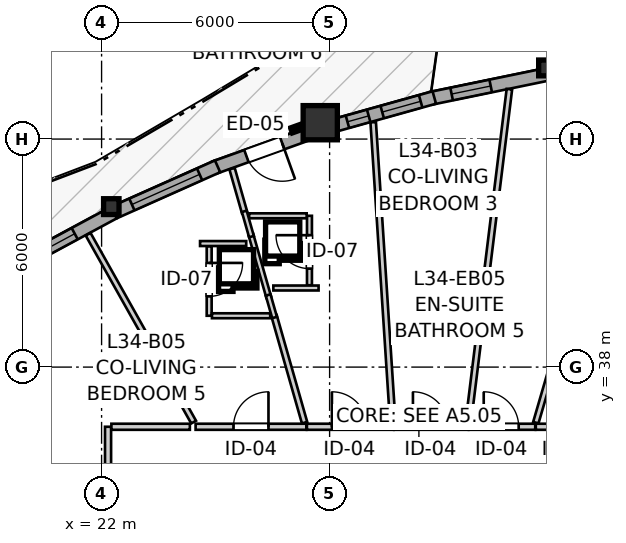
"""IFC4 building model, lengths in metres.
Left out: names, types, materials, properties, quantities, classifications, styles, units other than length and angle.
Written with IfcOpenShell. Run it as: python <this file> out.ifc"""

import sys

from ifc_helpers import new_model, si_unit, direction, frame, frame_2d, origin, origin_2d, place, context, subcontext, project, spatial, rectangle, i_section, extrude, source, transform, mapped, element, fill, save


model = new_model("IFC4")
c1 = context("Model", 3, precision=1e-05, world=origin(), true_north=direction((0.0, 1.0)))
c2 = subcontext(c1, "Body", "Model", "MODEL_VIEW")
j1 = project(units=[si_unit("LENGTHUNIT", "METRE"), si_unit("PLANEANGLEUNIT", "RADIAN")], contexts=[c1])
p1 = place(None, origin())
s1 = spatial("IfcSite", under=j1, at=p1, CompositionType="ELEMENT")
p2 = place(p1, origin())
s2 = spatial("IfcBuilding", under=s1, at=p2, CompositionType="ELEMENT")
p3 = place(p2, frame((0.0, 0.0, 115.2)))
s3 = spatial("IfcBuildingStorey", under=s2, at=p3, CompositionType="ELEMENT", Elevation=115.2)
m1 = source(origin(), c2, "Body", "SweptSolid", [
    extrude(i_section(OverallWidth=0.406, OverallDepth=0.416, WebThickness=0.027, FlangeThickness=0.044, FilletRadius=0.015, at=origin_2d()), origin(), (0.0, 0.0, 1.0), 2.95),
])
p4 = place(p3, frame((33.704, 45.872, 0.0), z_axis=(0.0, 0.0, 1.0), x_axis=(1.0, 0.0, 0.0)))
e1 = element("IfcColumn", 1, at=p4, inside=s3, PredefinedType="PILASTER", context=c2, shape_type="MappedRepresentation", body=[
    mapped(m1, transform((0.0, 0.0, 0.0), x_axis=(1.0, 0.0, 0.0), y_axis=(0.0, 1.0, 0.0), z_axis=(0.0, 0.0, 1.0), scale=1.0)),
])
m2 = source(origin(), c2, "Body", "SweptSolid", [
    extrude(rectangle(XDim=0.9, YDim=0.9, at=origin_2d()), origin(), (0.0, 0.0, 1.0), 2.95),
])
p5 = place(p3, frame((27.754, 44.431, 0.0), z_axis=(0.0, 0.0, 1.0), x_axis=(1.0, 0.0, 0.0)))
e2 = element("IfcColumn", 2, at=p5, inside=s3, PredefinedType="COLUMN", context=c2, shape_type="MappedRepresentation", body=[
    mapped(m2, transform((0.0, 0.0, 0.0), x_axis=(1.0, 0.0, 0.0), y_axis=(0.0, 1.0, 0.0), z_axis=(0.0, 0.0, 1.0), scale=1.0)),
])
p6 = place(p3, frame((22.256, 42.222, 0.0), z_axis=(0.0, 0.0, 1.0), x_axis=(1.0, 0.0, 0.0)))
e3 = element("IfcColumn", 3, at=p6, inside=s3, PredefinedType="PILASTER", context=c2, shape_type="MappedRepresentation", body=[
    mapped(m1, transform((0.0, 0.0, 0.0), x_axis=(1.0, 0.0, 0.0), y_axis=(0.0, 1.0, 0.0), z_axis=(0.0, 0.0, 1.0), scale=1.0)),
])
p7 = place(p3, frame((33.719, 45.701, 0.0), z_axis=(0.0, 0.0, 1.0), x_axis=(-0.979417849231, -0.201843198072, 0.0)))
e4 = element("IfcWall", 4, at=p7, inside=s3, PredefinedType="SOLIDWALL", context=c2, shape_type="SweptSolid", body=[
    extrude(rectangle(XDim=3.113, YDim=0.34, at=frame_2d((1.557, 0.0))), origin(), (0.0, 0.0, 1.0), 2.48),
])
p8 = place(p7, frame((1.511, 0.0, 0.82)))
e5 = element("IfcOpeningElement", 5, at=p8, cuts=e4, PredefinedType="OPENING", context=c2, shape_type="SweptSolid", body=[
    extrude(rectangle(XDim=1.05, YDim=1.45, at=frame_2d((0.525, 0.725))), frame((0.0, 0.18, 0.0), z_axis=(0.0, -1.0, 0.0), x_axis=(1.0, 0.0, 0.0)), (0.0, 0.0, 1.0), 0.36),
])
p9 = place(p3, frame((30.755, 45.094, 0.0), z_axis=(0.0, 0.0, 1.0), x_axis=(-0.963040794714, -0.269355578589, 0.0)))
e6 = element("IfcWall", 6, at=p9, inside=s3, PredefinedType="SOLIDWALL", context=c2, shape_type="SweptSolid", body=[
    extrude(rectangle(XDim=2.839, YDim=0.34, at=frame_2d((1.419, 0.0))), origin(), (0.0, 0.0, 1.0), 2.48),
])
p10 = place(p9, frame((0.373, 0.0, 0.82)))
e7 = element("IfcOpeningElement", 7, at=p10, cuts=e6, PredefinedType="OPENING", context=c2, shape_type="SweptSolid", body=[
    extrude(rectangle(XDim=1.05, YDim=1.45, at=frame_2d((0.525, 0.725))), frame((0.0, 0.18, 0.0), z_axis=(0.0, -1.0, 0.0), x_axis=(1.0, 0.0, 0.0)), (0.0, 0.0, 1.0), 0.36),
])
p11 = place(p9, frame((1.792, 0.0, 0.82)))
e8 = element("IfcOpeningElement", 8, at=p11, cuts=e6, PredefinedType="OPENING", context=c2, shape_type="SweptSolid", body=[
    extrude(rectangle(XDim=0.58, YDim=1.35, at=frame_2d((0.29, 0.675))), frame((0.0, 0.18, 0.0), z_axis=(0.0, -1.0, 0.0), x_axis=(1.0, 0.0, 0.0)), (0.0, 0.0, 1.0), 0.36),
])
p12 = place(p3, frame((27.595, 44.193, 0.0), z_axis=(0.0, 0.0, 1.0), x_axis=(-0.94107471628, -0.338198726163, 0.0)))
e9 = element("IfcWall", 9, at=p12, inside=s3, PredefinedType="SOLIDWALL", context=c2, shape_type="SweptSolid", body=[
    extrude(rectangle(XDim=2.789, YDim=0.34, at=frame_2d((1.395, 0.0))), origin(), (0.0, 0.0, 1.0), 2.48),
])
p13 = place(p12, frame((0.895, 0.0, 0.0)))
e10 = element("IfcOpeningElement", 10, at=p13, cuts=e9, PredefinedType="OPENING", context=c2, shape_type="SweptSolid", body=[
    extrude(rectangle(XDim=1.0, YDim=2.1, at=frame_2d((0.5, 1.05))), frame((0.0, 0.18, 0.0), z_axis=(0.0, -1.0, 0.0), x_axis=(1.0, 0.0, 0.0)), (0.0, 0.0, 1.0), 0.36),
])
p14 = place(p3, frame((25.052, 43.283, 0.0), z_axis=(0.0, 0.0, 1.0), x_axis=(-0.913400340023, -0.407062426227, 0.0)))
e11 = element("IfcWall", 11, at=p14, inside=s3, PredefinedType="SOLIDWALL", context=c2, shape_type="SweptSolid", body=[
    extrude(rectangle(XDim=2.966, YDim=0.34, at=frame_2d((1.483, 0.0))), origin(), (0.0, 0.0, 1.0), 2.48),
])
p15 = place(p14, frame((0.518, 0.0, 0.82)))
e12 = element("IfcOpeningElement", 12, at=p15, cuts=e11, PredefinedType="OPENING", context=c2, shape_type="SweptSolid", body=[
    extrude(rectangle(XDim=1.95, YDim=1.4, at=frame_2d((0.975, 0.7))), frame((0.0, 0.18, 0.0), z_axis=(0.0, -1.0, 0.0), x_axis=(1.0, 0.0, 0.0)), (0.0, 0.0, 1.0), 0.36),
])
p16 = place(p3, frame((22.319, 42.063, 0.0), z_axis=(0.0, 0.0, 1.0), x_axis=(-0.880050731383, -0.4748796797, 0.0)))
e13 = element("IfcWall", 13, at=p16, inside=s3, PredefinedType="SOLIDWALL", context=c2, shape_type="SweptSolid", body=[
    extrude(rectangle(XDim=2.949, YDim=0.34, at=frame_2d((1.475, 0.0))), origin(), (0.0, 0.0, 1.0), 2.48),
])
p17 = place(p16, frame((1.166, 0.0, 0.82)))
e14 = element("IfcOpeningElement", 14, at=p17, cuts=e13, PredefinedType="OPENING", context=c2, shape_type="SweptSolid", body=[
    extrude(rectangle(XDim=1.4, YDim=1.35, at=frame_2d((0.7, 0.675))), frame((0.0, 0.18, 0.0), z_axis=(0.0, -1.0, 0.0), x_axis=(1.0, 0.0, 0.0)), (0.0, 0.0, 1.0), 0.36),
])
p18 = place(p3, frame((22.17, 29.865, 0.0), z_axis=(0.0, 0.0, 1.0), x_axis=(0.0, 1.0, 0.0)))
e15 = element("IfcWall", 15, at=p18, inside=s3, PredefinedType="PARTITIONING", context=c2, shape_type="SweptSolid", body=[
    extrude(rectangle(XDim=6.565, YDim=0.16, at=frame_2d((3.282, 0.0))), origin(), (0.0, 0.0, 1.0), 2.95),
])
p19 = place(p18, frame((2.811, 0.0, 0.0)))
e16 = element("IfcOpeningElement", 16, at=p19, cuts=e15, PredefinedType="OPENING", context=c2, shape_type="SweptSolid", body=[
    extrude(rectangle(XDim=0.96, YDim=2.1, at=frame_2d((0.48, 1.05))), frame((0.0, 0.09, 0.0), z_axis=(0.0, -1.0, 0.0), x_axis=(1.0, 0.0, 0.0)), (0.0, 0.0, 1.0), 0.18),
])
p20 = place(p3, frame((24.474, 36.43, 0.0), z_axis=(0.0, 0.0, 1.0), x_axis=(1.0, 0.0, 0.0)))
e17 = element("IfcWall", 17, at=p20, inside=s3, PredefinedType="PARTITIONING", context=c2, shape_type="SweptSolid", body=[
    extrude(rectangle(XDim=2.914, YDim=0.16, at=frame_2d((1.457, 0.0))), origin(), (0.0, 0.0, 1.0), 2.588),
])
p21 = place(p20, frame((0.998, 0.0, 0.0)))
e18 = element("IfcOpeningElement", 18, at=p21, cuts=e17, PredefinedType="OPENING", context=c2, shape_type="SweptSolid", body=[
    extrude(rectangle(XDim=0.92, YDim=2.1, at=frame_2d((0.46, 1.05))), frame((0.0, 0.09, 0.0), z_axis=(0.0, -1.0, 0.0), x_axis=(1.0, 0.0, 0.0)), (0.0, 0.0, 1.0), 0.18),
])
p22 = place(p3, frame((27.403, 36.43, 0.0), z_axis=(0.0, 0.0, 1.0), x_axis=(1.0, 0.0, 0.0)))
e19 = element("IfcWall", 19, at=p22, inside=s3, PredefinedType="PARTITIONING", context=c2, shape_type="SweptSolid", body=[
    extrude(rectangle(XDim=2.282, YDim=0.16, at=frame_2d((1.141, 0.0))), origin(), (0.0, 0.0, 1.0), 2.95),
])
p23 = place(p22, frame((0.658, 0.0, 0.0)))
e20 = element("IfcOpeningElement", 20, at=p23, cuts=e19, PredefinedType="OPENING", context=c2, shape_type="SweptSolid", body=[
    extrude(rectangle(XDim=0.92, YDim=2.1, at=frame_2d((0.46, 1.05))), frame((0.0, 0.09, 0.0), z_axis=(0.0, -1.0, 0.0), x_axis=(1.0, 0.0, 0.0)), (0.0, 0.0, 1.0), 0.18),
])
p24 = place(p3, frame((29.7, 36.43, 0.0), z_axis=(0.0, 0.0, 1.0), x_axis=(1.0, 0.0, 0.0)))
e21 = element("IfcWall", 21, at=p24, inside=s3, PredefinedType="PARTITIONING", context=c2, shape_type="SweptSolid", body=[
    extrude(rectangle(XDim=1.951, YDim=0.16, at=frame_2d((0.976, 0.0))), origin(), (0.0, 0.0, 1.0), 2.95),
])
p25 = place(p24, frame((0.493, 0.0, 0.0)))
e22 = element("IfcOpeningElement", 22, at=p25, cuts=e21, PredefinedType="OPENING", context=c2, shape_type="SweptSolid", body=[
    extrude(rectangle(XDim=0.92, YDim=2.1, at=frame_2d((0.46, 1.05))), frame((0.0, 0.09, 0.0), z_axis=(0.0, -1.0, 0.0), x_axis=(1.0, 0.0, 0.0)), (0.0, 0.0, 1.0), 0.18),
])
p26 = place(p3, frame((24.831, 41.178, 0.0), z_axis=(0.0, 0.0, 1.0), x_axis=(0.0, -1.0, 0.0)))
e23 = element("IfcWall", 23, at=p26, inside=s3, PredefinedType="PARTITIONING", context=c2, shape_type="SweptSolid", body=[
    extrude(rectangle(XDim=1.827, YDim=0.13, at=frame_2d((0.914, 0.0))), origin(), (0.0, 0.0, 1.0), 2.95),
])
p27 = place(p26, frame((0.437, 0.0, 0.0)))
e24 = element("IfcOpeningElement", 24, at=p27, cuts=e23, PredefinedType="OPENING", context=c2, shape_type="SweptSolid", body=[
    extrude(rectangle(XDim=0.88, YDim=2.05, at=frame_2d((0.44, 1.025))), frame((0.0, 0.075, 0.0), z_axis=(0.0, -1.0, 0.0), x_axis=(1.0, 0.0, 0.0)), (0.0, 0.0, 1.0), 0.15),
])
p28 = place(p3, frame((27.47, 40.154, 0.0), z_axis=(0.0, 0.0, 1.0), x_axis=(0.0, 1.0, 0.0)))
e25 = element("IfcWall", 25, at=p28, inside=s3, PredefinedType="PARTITIONING", context=c2, shape_type="SweptSolid", body=[
    extrude(rectangle(XDim=1.827, YDim=0.13, at=frame_2d((0.914, 0.0))), origin(), (0.0, 0.0, 1.0), 2.95),
])
p29 = place(p28, frame((0.437, 0.0, 0.0)))
e26 = element("IfcOpeningElement", 26, at=p29, cuts=e25, PredefinedType="OPENING", context=c2, shape_type="SweptSolid", body=[
    extrude(rectangle(XDim=0.88, YDim=2.05, at=frame_2d((0.44, 1.025))), frame((0.0, 0.075, 0.0), z_axis=(0.0, -1.0, 0.0), x_axis=(1.0, 0.0, 0.0)), (0.0, 0.0, 1.0), 0.15),
])
p30 = place(p3, frame((31.666, 36.43, 0.0), z_axis=(0.0, 0.0, 1.0), x_axis=(1.0, 0.0, 0.0)))
e27 = element("IfcWall", 27, at=p30, inside=s3, PredefinedType="PARTITIONING", context=c2, shape_type="SweptSolid", body=[
    extrude(rectangle(XDim=1.745, YDim=0.16, at=frame_2d((0.873, 0.0))), origin(), (0.0, 0.0, 1.0), 2.95),
])
p31 = place(p30, frame((0.389, 0.0, 0.0)))
e28 = element("IfcOpeningElement", 28, at=p31, cuts=e27, PredefinedType="OPENING", context=c2, shape_type="SweptSolid", body=[
    extrude(rectangle(XDim=0.92, YDim=2.1, at=frame_2d((0.46, 1.05))), frame((0.0, 0.09, 0.0), z_axis=(0.0, -1.0, 0.0), x_axis=(1.0, 0.0, 0.0)), (0.0, 0.0, 1.0), 0.18),
])
p32 = place(p3, frame((33.426, 36.43, 0.0), z_axis=(0.0, 0.0, 1.0), x_axis=(1.0, 0.0, 0.0)))
e29 = element("IfcWall", 29, at=p32, inside=s3, PredefinedType="PARTITIONING", context=c2, shape_type="SweptSolid", body=[
    extrude(rectangle(XDim=1.68, YDim=0.16, at=frame_2d((0.84, 0.0))), origin(), (0.0, 0.0, 1.0), 2.95),
])
p33 = place(p32, frame((0.38, 0.0, 0.0)))
e30 = element("IfcOpeningElement", 30, at=p33, cuts=e29, PredefinedType="OPENING", context=c2, shape_type="SweptSolid", body=[
    extrude(rectangle(XDim=0.92, YDim=2.1, at=frame_2d((0.46, 1.05))), frame((0.0, 0.09, 0.0), z_axis=(0.0, -1.0, 0.0), x_axis=(1.0, 0.0, 0.0)), (0.0, 0.0, 1.0), 0.18),
])
p34 = place(p3, frame((33.427, 36.538, 0.0), z_axis=(0.0, 0.0, 1.0), x_axis=(0.280326379037, 0.959904745908, 0.0)))
e31 = element("IfcWall", 31, at=p34, inside=s3, PredefinedType="PARTITIONING", context=c2, shape_type="SweptSolid", body=[
    extrude(rectangle(XDim=10.082, YDim=0.145, at=frame_2d((5.041, 0.0))), origin(), (0.0, 0.0, 1.0), 2.95),
])
p35 = place(p3, frame((31.648, 36.527, 0.0), z_axis=(0.0, 0.0, 1.0), x_axis=(0.122371290087, 0.992484391496, 0.0)))
e32 = element("IfcWall", 32, at=p35, inside=s3, PredefinedType="PARTITIONING", context=c2, shape_type="SweptSolid", body=[
    extrude(rectangle(XDim=8.852, YDim=0.145, at=frame_2d((4.426, 0.0))), origin(), (0.0, 0.0, 1.0), 2.95),
])
p36 = place(p3, frame((29.147, 44.444, 0.0), z_axis=(0.0, 0.0, 1.0), x_axis=(0.065112427166, -0.997877934333, 0.0)))
e33 = element("IfcWall", 33, at=p36, inside=s3, PredefinedType="PARTITIONING", context=c2, shape_type="SweptSolid", body=[
    extrude(rectangle(XDim=7.938, YDim=0.145, at=frame_2d((3.969, 0.0))), origin(), (0.0, 0.0, 1.0), 2.95),
])
p37 = place(p3, frame((21.645, 41.497, 0.0), z_axis=(0.0, 0.0, 1.0), x_axis=(0.489699005063, -0.871891555436, 0.0)))
e34 = element("IfcWall", 34, at=p37, inside=s3, PredefinedType="PARTITIONING", context=c2, shape_type="SweptSolid", body=[
    extrude(rectangle(XDim=5.671, YDim=0.145, at=frame_2d((2.835, 0.0))), origin(), (0.0, 0.0, 1.0), 2.95),
])
p38 = place(p3, frame((26.539, 39.351, 0.0), z_axis=(0.0, 0.0, 1.0), x_axis=(0.274214096408, -0.961668669205, 0.0)))
e35 = element("IfcWall", 35, at=p38, inside=s3, PredefinedType="PARTITIONING", context=c2, shape_type="SweptSolid", body=[
    extrude(rectangle(XDim=2.926, YDim=0.145, at=frame_2d((1.463, 0.0))), origin(), (0.0, 0.0, 1.0), 2.95),
])
p39 = place(p3, frame((22.258, 36.43, 0.0), z_axis=(0.0, 0.0, 1.0), x_axis=(1.0, 0.0, 0.0)))
e36 = element("IfcWall", 36, at=p39, inside=s3, PredefinedType="PARTITIONING", context=c2, shape_type="SweptSolid", body=[
    extrude(rectangle(XDim=2.065, YDim=0.16, at=frame_2d((1.032, 0.0))), origin(), (0.0, 0.0, 1.0), 2.95),
])
p40 = place(p3, frame((24.904, 39.351, 0.0), z_axis=(0.0, 0.0, 1.0), x_axis=(1.0, 0.0, 0.0)))
e37 = element("IfcWall", 37, at=p40, inside=s3, PredefinedType="PARTITIONING", context=c2, shape_type="SweptSolid", body=[
    extrude(rectangle(XDim=1.533, YDim=0.13, at=frame_2d((0.767, 0.0))), origin(), (0.0, 0.0, 1.0), 2.95),
])
p41 = place(p3, frame((25.882, 41.981, 0.0), z_axis=(0.0, 0.0, 1.0), x_axis=(1.0, 0.0, 0.0)))
e38 = element("IfcWall", 38, at=p41, inside=s3, PredefinedType="PARTITIONING", context=c2, shape_type="SweptSolid", body=[
    extrude(rectangle(XDim=1.515, YDim=0.13, at=frame_2d((0.757, 0.0))), origin(), (0.0, 0.0, 1.0), 2.95),
])
p42 = place(p3, frame((25.433, 43.222, 0.0), z_axis=(0.0, 0.0, 1.0), x_axis=(0.274641170969, -0.961546788882, 0.0)))
e39 = element("IfcWall", 39, at=p42, inside=s3, PredefinedType="PARTITIONING", context=c2, shape_type="SweptSolid", body=[
    extrude(rectangle(XDim=1.21, YDim=0.145, at=frame_2d((0.605, 0.0))), origin(), (0.0, 0.0, 1.0), 2.95),
])
p43 = place(p3, frame((25.93, 41.482, 0.0), z_axis=(0.0, 0.0, 1.0), x_axis=(0.274344452215, -0.961631489469, 0.0)))
e40 = element("IfcWall", 40, at=p43, inside=s3, PredefinedType="PARTITIONING", context=c2, shape_type="SweptSolid", body=[
    extrude(rectangle(XDim=1.712, YDim=0.13, at=frame_2d((0.856, 0.0))), origin(), (0.0, 0.0, 1.0), 2.95),
])
p44 = place(p3, frame((24.591, 41.251, 0.0), z_axis=(0.0, 0.0, 1.0), x_axis=(1.0, 0.0, 0.0)))
e41 = element("IfcWall", 41, at=p44, inside=s3, PredefinedType="PARTITIONING", context=c2, shape_type="SweptSolid", body=[
    extrude(rectangle(XDim=1.215, YDim=0.13, at=frame_2d((0.607, 0.0))), origin(), (0.0, 0.0, 1.0), 2.95),
])
p45 = place(p3, frame((26.52, 40.081, 0.0), z_axis=(0.0, 0.0, 1.0), x_axis=(1.0, 0.0, 0.0)))
e42 = element("IfcWall", 42, at=p45, inside=s3, PredefinedType="PARTITIONING", context=c2, shape_type="SweptSolid", body=[
    extrude(rectangle(XDim=1.19, YDim=0.13, at=frame_2d((0.595, 0.0))), origin(), (0.0, 0.0, 1.0), 2.95),
])
p46 = place(p3, frame((26.383, 39.898, 0.0), z_axis=(0.0, 0.0, 1.0), x_axis=(0.274982401426, -0.961449259663, 0.0)))
e43 = element("IfcWall", 43, at=p46, inside=s3, PredefinedType="PARTITIONING", context=c2, shape_type="SweptSolid", body=[
    extrude(rectangle(XDim=0.617, YDim=0.13, at=frame_2d((0.309, 0.0))), origin(), (0.0, 0.0, 1.0), 2.95),
])
p47 = place(p3, frame((25.755, 42.099, 0.0), z_axis=(0.0, 0.0, 1.0), x_axis=(0.273881956808, -0.961763314821, 0.0)))
e44 = element("IfcWall", 44, at=p47, inside=s3, PredefinedType="PARTITIONING", context=c2, shape_type="SweptSolid", body=[
    extrude(rectangle(XDim=0.692, YDim=0.13, at=frame_2d((0.346, 0.0))), origin(), (0.0, 0.0, 1.0), 2.95),
])
m3 = source(origin(), c2, "Body", "SweptSolid", [
    extrude(rectangle(XDim=1.05, YDim=1.45, at=frame_2d((0.525, 0.725))), frame((0.0, 0.03, 0.0), z_axis=(0.0, -1.0, 0.0), x_axis=(1.0, 0.0, 0.0)), (0.0, 0.0, 1.0), 0.06),
])
p48 = place(p8, origin())
e45 = element("IfcWindow", 45, at=p48, inside=s3, PartitioningType="SINGLE_PANEL", PredefinedType="WINDOW", context=c2, shape_type="MappedRepresentation", body=[
    mapped(m3, transform((0.0, 0.0, 0.0), x_axis=(1.0, 0.0, 0.0), y_axis=(0.0, 1.0, 0.0), z_axis=(0.0, 0.0, 1.0), scale=1.0)),
])
fill(e5, e45)
p49 = place(p10, origin())
e46 = element("IfcWindow", 46, at=p49, inside=s3, PartitioningType="SINGLE_PANEL", PredefinedType="WINDOW", context=c2, shape_type="MappedRepresentation", body=[
    mapped(m3, transform((0.0, 0.0, 0.0), x_axis=(1.0, 0.0, 0.0), y_axis=(0.0, 1.0, 0.0), z_axis=(0.0, 0.0, 1.0), scale=1.0)),
])
fill(e7, e46)
m4 = source(origin(), c2, "Body", "SweptSolid", [
    extrude(rectangle(XDim=0.58, YDim=1.35, at=frame_2d((0.29, 0.675))), frame((0.0, 0.03, 0.0), z_axis=(0.0, -1.0, 0.0), x_axis=(1.0, 0.0, 0.0)), (0.0, 0.0, 1.0), 0.06),
])
p50 = place(p11, origin())
e47 = element("IfcWindow", 47, at=p50, inside=s3, PartitioningType="SINGLE_PANEL", PredefinedType="WINDOW", context=c2, shape_type="MappedRepresentation", body=[
    mapped(m4, transform((0.0, 0.0, 0.0), x_axis=(1.0, 0.0, 0.0), y_axis=(0.0, 1.0, 0.0), z_axis=(0.0, 0.0, 1.0), scale=1.0)),
])
fill(e8, e47)
m5 = source(origin(), c2, "Body", "SweptSolid", [
    extrude(rectangle(XDim=1.95, YDim=1.4, at=frame_2d((0.975, 0.7))), frame((0.0, 0.03, 0.0), z_axis=(0.0, -1.0, 0.0), x_axis=(1.0, 0.0, 0.0)), (0.0, 0.0, 1.0), 0.06),
])
p51 = place(p15, origin())
e48 = element("IfcWindow", 48, at=p51, inside=s3, PartitioningType="SINGLE_PANEL", PredefinedType="WINDOW", context=c2, shape_type="MappedRepresentation", body=[
    mapped(m5, transform((0.0, 0.0, 0.0), x_axis=(1.0, 0.0, 0.0), y_axis=(0.0, 1.0, 0.0), z_axis=(0.0, 0.0, 1.0), scale=1.0)),
])
fill(e12, e48)
m6 = source(origin(), c2, "Body", "SweptSolid", [
    extrude(rectangle(XDim=1.4, YDim=1.35, at=frame_2d((0.7, 0.675))), frame((0.0, 0.03, 0.0), z_axis=(0.0, -1.0, 0.0), x_axis=(1.0, 0.0, 0.0)), (0.0, 0.0, 1.0), 0.06),
])
p52 = place(p17, origin())
e49 = element("IfcWindow", 49, at=p52, inside=s3, PartitioningType="SINGLE_PANEL", PredefinedType="WINDOW", context=c2, shape_type="MappedRepresentation", body=[
    mapped(m6, transform((0.0, 0.0, 0.0), x_axis=(1.0, 0.0, 0.0), y_axis=(0.0, 1.0, 0.0), z_axis=(0.0, 0.0, 1.0), scale=1.0)),
])
fill(e14, e49)
m7 = source(origin(), c2, "Body", "SweptSolid", [
    extrude(rectangle(XDim=1.0, YDim=2.1, at=frame_2d((0.5, 1.05))), frame((0.0, 0.025, 0.0), z_axis=(0.0, -1.0, 0.0), x_axis=(1.0, 0.0, 0.0)), (0.0, 0.0, 1.0), 0.05),
])
p53 = place(p13, origin())
e50 = element("IfcDoor", 50, at=p53, inside=s3, OperationType="SINGLE_SWING_LEFT", PredefinedType="DOOR", context=c2, shape_type="MappedRepresentation", body=[
    mapped(m7, transform((0.0, 0.0, 0.0), x_axis=(1.0, 0.0, 0.0), y_axis=(0.0, 1.0, 0.0), z_axis=(0.0, 0.0, 1.0), scale=1.0)),
])
fill(e10, e50)
m8 = source(origin(), c2, "Body", "SweptSolid", [
    extrude(rectangle(XDim=0.92, YDim=2.1, at=frame_2d((0.46, 1.05))), frame((0.0, 0.025, 0.0), z_axis=(0.0, -1.0, 0.0), x_axis=(1.0, 0.0, 0.0)), (0.0, 0.0, 1.0), 0.05),
])
p54 = place(p21, origin())
e51 = element("IfcDoor", 51, at=p54, inside=s3, OperationType="SINGLE_SWING_RIGHT", PredefinedType="DOOR", context=c2, shape_type="MappedRepresentation", body=[
    mapped(m8, transform((0.0, 0.0, 0.0), x_axis=(1.0, 0.0, 0.0), y_axis=(0.0, 1.0, 0.0), z_axis=(0.0, 0.0, 1.0), scale=1.0)),
])
fill(e18, e51)
p55 = place(p23, origin())
e52 = element("IfcDoor", 52, at=p55, inside=s3, OperationType="SINGLE_SWING_LEFT", PredefinedType="DOOR", context=c2, shape_type="MappedRepresentation", body=[
    mapped(m8, transform((0.0, 0.0, 0.0), x_axis=(1.0, 0.0, 0.0), y_axis=(0.0, 1.0, 0.0), z_axis=(0.0, 0.0, 1.0), scale=1.0)),
])
fill(e20, e52)
p56 = place(p25, origin())
e53 = element("IfcDoor", 53, at=p56, inside=s3, OperationType="SINGLE_SWING_LEFT", PredefinedType="DOOR", context=c2, shape_type="MappedRepresentation", body=[
    mapped(m8, transform((0.0, 0.0, 0.0), x_axis=(1.0, 0.0, 0.0), y_axis=(0.0, 1.0, 0.0), z_axis=(0.0, 0.0, 1.0), scale=1.0)),
])
fill(e22, e53)
m9 = source(origin(), c2, "Body", "SweptSolid", [
    extrude(rectangle(XDim=0.88, YDim=2.05, at=frame_2d((0.44, 1.025))), frame((0.0, 0.025, 0.0), z_axis=(0.0, -1.0, 0.0), x_axis=(1.0, 0.0, 0.0)), (0.0, 0.0, 1.0), 0.05),
])
p57 = place(p27, origin())
e54 = element("IfcDoor", 54, at=p57, inside=s3, OperationType="SINGLE_SWING_LEFT", PredefinedType="DOOR", context=c2, shape_type="MappedRepresentation", body=[
    mapped(m9, transform((0.0, 0.0, 0.0), x_axis=(1.0, 0.0, 0.0), y_axis=(0.0, 1.0, 0.0), z_axis=(0.0, 0.0, 1.0), scale=1.0)),
])
fill(e24, e54)
p58 = place(p29, origin())
e55 = element("IfcDoor", 55, at=p58, inside=s3, OperationType="SINGLE_SWING_RIGHT", PredefinedType="DOOR", context=c2, shape_type="MappedRepresentation", body=[
    mapped(m9, transform((0.0, 0.0, 0.0), x_axis=(1.0, 0.0, 0.0), y_axis=(0.0, 1.0, 0.0), z_axis=(0.0, 0.0, 1.0), scale=1.0)),
])
fill(e26, e55)
p59 = place(p31, origin())
e56 = element("IfcDoor", 56, at=p59, inside=s3, OperationType="SINGLE_SWING_LEFT", PredefinedType="DOOR", context=c2, shape_type="MappedRepresentation", body=[
    mapped(m8, transform((0.0, 0.0, 0.0), x_axis=(1.0, 0.0, 0.0), y_axis=(0.0, 1.0, 0.0), z_axis=(0.0, 0.0, 1.0), scale=1.0)),
])
fill(e28, e56)
save(model, sys.argv[1])
